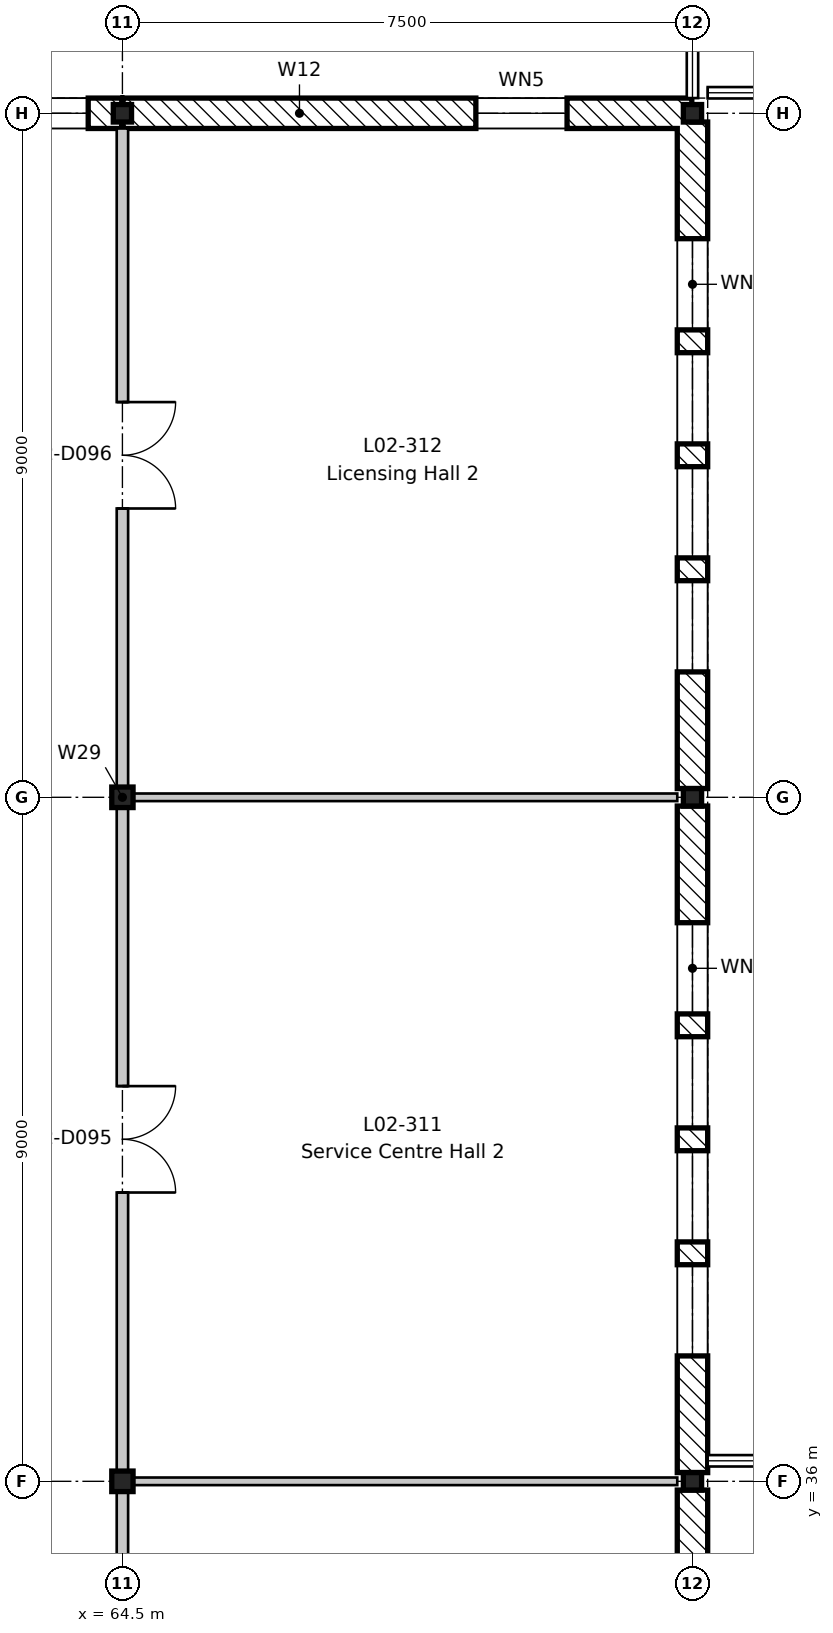
"""IFC4 building model, lengths in metres.
Left out: names, types, materials, properties, quantities, classifications, styles, units other than length and angle.
Written with IfcOpenShell. Run it as: python <this file> out.ifc"""

import sys

from ifc_helpers import new_model, si_unit, direction, frame, frame_2d, origin, origin_2d, place, context, subcontext, project, spatial, rectangle, i_section, extrude, element, fill, save


model = new_model("IFC4")
c1 = context("Model", 3, precision=1e-05, world=origin(), true_north=direction((0.0, 1.0)))
c2 = subcontext(c1, "Body", "Model", "MODEL_VIEW")
j1 = project(units=[si_unit("LENGTHUNIT", "METRE"), si_unit("PLANEANGLEUNIT", "RADIAN")], contexts=[c1])
p1 = place(None, origin())
s1 = spatial("IfcSite", under=j1, at=p1, CompositionType="ELEMENT")
p2 = place(p1, origin())
s2 = spatial("IfcBuilding", under=s1, at=p2, CompositionType="ELEMENT")
p3 = place(p2, frame((0.0, 0.0, 9.9)))
s3 = spatial("IfcBuildingStorey", under=s2, at=p3, CompositionType="ELEMENT", Elevation=9.9)
for number, where, z_axis, x_axis in (
    (1, (64.5, 36.0, -0.2), (0.0, 0.0, 1.0), (1.0, 0.0, 0.0)),
    (2, (64.5, 45.0, -0.2), (0.0, 0.0, 1.0), (1.0, 0.0, 0.0)),
):
    element("IfcColumn", number, at=place(p3, frame(where, z_axis=z_axis, x_axis=x_axis)), inside=s3, PredefinedType="COLUMN", context=c2, shape_type="SweptSolid", body=[
        extrude(i_section(OverallWidth=0.28, OverallDepth=0.27, WebThickness=0.008, FlangeThickness=0.013, FilletRadius=0.024, at=origin_2d()), origin(), (0.0, 0.0, 1.0), 4.5),
    ])
for number, where, z_axis, x_axis in (
    (3, (64.5, 54.0, -0.2), (0.0, 0.0, 1.0), (1.0, 0.0, 0.0)),
    (4, (72.0, 36.0, -0.2), (0.0, 0.0, 1.0), (1.0, 0.0, 0.0)),
    (5, (72.0, 45.0, -0.2), (0.0, 0.0, 1.0), (1.0, 0.0, 0.0)),
    (6, (72.0, 54.0, -0.2), (0.0, 0.0, 1.0), (1.0, 0.0, 0.0)),
):
    element("IfcColumn", number, at=place(p3, frame(where, z_axis=z_axis, x_axis=x_axis)), inside=s3, PredefinedType="COLUMN", context=c2, shape_type="SweptSolid", body=[
        extrude(i_section(OverallWidth=0.24, OverallDepth=0.23, WebThickness=0.008, FlangeThickness=0.012, FilletRadius=0.021, at=origin_2d()), origin(), (0.0, 0.0, 1.0), 4.5),
    ])
p4 = place(p3, frame((61.509, 54.0, 0.0), z_axis=(0.0, 0.0, 1.0), x_axis=(1.0, 0.0, 0.0)))
e7 = element("IfcWall", 7, at=p4, inside=s3, PredefinedType="STANDARD", context=c2, shape_type="SweptSolid", body=[
    extrude(rectangle(XDim=2.982, YDim=0.4, at=frame_2d((1.491, 0.0))), origin(), (0.0, 0.0, 1.0), 4.1),
])
p5 = place(p4, frame((0.441, 0.0, 0.9)))
e8 = element("IfcOpeningElement", 8, at=p5, cuts=e7, PredefinedType="OPENING", context=c2, shape_type="SweptSolid", body=[
    extrude(rectangle(XDim=2.1, YDim=2.1, at=frame_2d((1.05, 1.05))), frame((0.0, 0.21, 0.0), z_axis=(0.0, -1.0, 0.0), x_axis=(1.0, 0.0, 0.0)), (0.0, 0.0, 1.0), 0.42),
])
p6 = place(p3, frame((64.509, 54.0, 0.0), z_axis=(0.0, 0.0, 1.0), x_axis=(1.0, 0.0, 0.0)))
e9 = element("IfcWall", 9, at=p6, inside=s3, PredefinedType="STANDARD", context=c2, shape_type="SweptSolid", body=[
    extrude(rectangle(XDim=7.482, YDim=0.4, at=frame_2d((3.741, 0.0))), origin(), (0.0, 0.0, 1.0), 3.97),
])
p7 = place(p6, frame((4.641, 0.0, 0.6)))
e10 = element("IfcOpeningElement", 10, at=p7, cuts=e9, PredefinedType="OPENING", context=c2, shape_type="SweptSolid", body=[
    extrude(rectangle(XDim=1.2, YDim=3.0, at=frame_2d((0.6, 1.5))), frame((0.0, 0.21, 0.0), z_axis=(0.0, -1.0, 0.0), x_axis=(1.0, 0.0, 0.0)), (0.0, 0.0, 1.0), 0.42),
])
p8 = place(p3, frame((72.0, 35.885, 0.0), z_axis=(0.0, 0.0, 1.0), x_axis=(0.0, -1.0, 0.0)))
e11 = element("IfcWall", 11, at=p8, inside=s3, PredefinedType="STANDARD", context=c2, shape_type="SweptSolid", body=[
    extrude(rectangle(XDim=8.77, YDim=0.4, at=frame_2d((4.385, 0.0))), origin(), (0.0, 0.0, 1.0), 3.9),
])
p9 = place(p8, frame((6.035, 0.0, 0.6)))
e12 = element("IfcOpeningElement", 12, at=p9, cuts=e11, PredefinedType="OPENING", context=c2, shape_type="SweptSolid", body=[
    extrude(rectangle(XDim=1.2, YDim=3.0, at=frame_2d((0.6, 1.5))), frame((0.0, 0.21, 0.0), z_axis=(0.0, -1.0, 0.0), x_axis=(1.0, 0.0, 0.0)), (0.0, 0.0, 1.0), 0.42),
])
p10 = place(p8, frame((4.535, 0.0, 0.6)))
e13 = element("IfcOpeningElement", 13, at=p10, cuts=e11, PredefinedType="OPENING", context=c2, shape_type="SweptSolid", body=[
    extrude(rectangle(XDim=1.2, YDim=3.0, at=frame_2d((0.6, 1.5))), frame((0.0, 0.21, 0.0), z_axis=(0.0, -1.0, 0.0), x_axis=(1.0, 0.0, 0.0)), (0.0, 0.0, 1.0), 0.42),
])
p11 = place(p8, frame((3.035, 0.0, 0.6)))
e14 = element("IfcOpeningElement", 14, at=p11, cuts=e11, PredefinedType="OPENING", context=c2, shape_type="SweptSolid", body=[
    extrude(rectangle(XDim=1.2, YDim=3.0, at=frame_2d((0.6, 1.5))), frame((0.0, 0.21, 0.0), z_axis=(0.0, -1.0, 0.0), x_axis=(1.0, 0.0, 0.0)), (0.0, 0.0, 1.0), 0.42),
])
p12 = place(p8, frame((1.535, 0.0, 0.6)))
e15 = element("IfcOpeningElement", 15, at=p12, cuts=e11, PredefinedType="OPENING", context=c2, shape_type="SweptSolid", body=[
    extrude(rectangle(XDim=1.2, YDim=3.0, at=frame_2d((0.6, 1.5))), frame((0.0, 0.21, 0.0), z_axis=(0.0, -1.0, 0.0), x_axis=(1.0, 0.0, 0.0)), (0.0, 0.0, 1.0), 0.42),
])
p13 = place(p3, frame((72.0, 44.885, 0.0), z_axis=(0.0, 0.0, 1.0), x_axis=(0.0, -1.0, 0.0)))
e16 = element("IfcWall", 16, at=p13, inside=s3, PredefinedType="STANDARD", context=c2, shape_type="SweptSolid", body=[
    extrude(rectangle(XDim=8.77, YDim=0.4, at=frame_2d((4.385, 0.0))), origin(), (0.0, 0.0, 1.0), 3.9),
])
p14 = place(p13, frame((6.035, 0.0, 0.6)))
e17 = element("IfcOpeningElement", 17, at=p14, cuts=e16, PredefinedType="OPENING", context=c2, shape_type="SweptSolid", body=[
    extrude(rectangle(XDim=1.2, YDim=3.0, at=frame_2d((0.6, 1.5))), frame((0.0, 0.21, 0.0), z_axis=(0.0, -1.0, 0.0), x_axis=(1.0, 0.0, 0.0)), (0.0, 0.0, 1.0), 0.42),
])
p15 = place(p13, frame((4.535, 0.0, 0.6)))
e18 = element("IfcOpeningElement", 18, at=p15, cuts=e16, PredefinedType="OPENING", context=c2, shape_type="SweptSolid", body=[
    extrude(rectangle(XDim=1.2, YDim=3.0, at=frame_2d((0.6, 1.5))), frame((0.0, 0.21, 0.0), z_axis=(0.0, -1.0, 0.0), x_axis=(1.0, 0.0, 0.0)), (0.0, 0.0, 1.0), 0.42),
])
p16 = place(p13, frame((3.035, 0.0, 0.6)))
e19 = element("IfcOpeningElement", 19, at=p16, cuts=e16, PredefinedType="OPENING", context=c2, shape_type="SweptSolid", body=[
    extrude(rectangle(XDim=1.2, YDim=3.0, at=frame_2d((0.6, 1.5))), frame((0.0, 0.21, 0.0), z_axis=(0.0, -1.0, 0.0), x_axis=(1.0, 0.0, 0.0)), (0.0, 0.0, 1.0), 0.42),
])
p17 = place(p13, frame((1.535, 0.0, 0.6)))
e20 = element("IfcOpeningElement", 20, at=p17, cuts=e16, PredefinedType="OPENING", context=c2, shape_type="SweptSolid", body=[
    extrude(rectangle(XDim=1.2, YDim=3.0, at=frame_2d((0.6, 1.5))), frame((0.0, 0.21, 0.0), z_axis=(0.0, -1.0, 0.0), x_axis=(1.0, 0.0, 0.0)), (0.0, 0.0, 1.0), 0.42),
])
p18 = place(p3, frame((72.0, 53.885, 0.0), z_axis=(0.0, 0.0, 1.0), x_axis=(0.0, -1.0, 0.0)))
e21 = element("IfcWall", 21, at=p18, inside=s3, PredefinedType="STANDARD", context=c2, shape_type="SweptSolid", body=[
    extrude(rectangle(XDim=8.77, YDim=0.4, at=frame_2d((4.385, 0.0))), origin(), (0.0, 0.0, 1.0), 3.9),
])
p19 = place(p18, frame((6.035, 0.0, 0.6)))
e22 = element("IfcOpeningElement", 22, at=p19, cuts=e21, PredefinedType="OPENING", context=c2, shape_type="SweptSolid", body=[
    extrude(rectangle(XDim=1.2, YDim=3.0, at=frame_2d((0.6, 1.5))), frame((0.0, 0.21, 0.0), z_axis=(0.0, -1.0, 0.0), x_axis=(1.0, 0.0, 0.0)), (0.0, 0.0, 1.0), 0.42),
])
p20 = place(p18, frame((4.535, 0.0, 0.6)))
e23 = element("IfcOpeningElement", 23, at=p20, cuts=e21, PredefinedType="OPENING", context=c2, shape_type="SweptSolid", body=[
    extrude(rectangle(XDim=1.2, YDim=3.0, at=frame_2d((0.6, 1.5))), frame((0.0, 0.21, 0.0), z_axis=(0.0, -1.0, 0.0), x_axis=(1.0, 0.0, 0.0)), (0.0, 0.0, 1.0), 0.42),
])
p21 = place(p18, frame((3.035, 0.0, 0.6)))
e24 = element("IfcOpeningElement", 24, at=p21, cuts=e21, PredefinedType="OPENING", context=c2, shape_type="SweptSolid", body=[
    extrude(rectangle(XDim=1.2, YDim=3.0, at=frame_2d((0.6, 1.5))), frame((0.0, 0.21, 0.0), z_axis=(0.0, -1.0, 0.0), x_axis=(1.0, 0.0, 0.0)), (0.0, 0.0, 1.0), 0.42),
])
p22 = place(p18, frame((1.535, 0.0, 0.6)))
e25 = element("IfcOpeningElement", 25, at=p22, cuts=e21, PredefinedType="OPENING", context=c2, shape_type="SweptSolid", body=[
    extrude(rectangle(XDim=1.2, YDim=3.0, at=frame_2d((0.6, 1.5))), frame((0.0, 0.21, 0.0), z_axis=(0.0, -1.0, 0.0), x_axis=(1.0, 0.0, 0.0)), (0.0, 0.0, 1.0), 0.42),
])
for number, where, z_axis, x_axis in (
    (26, (64.575, 36.0, 0.0), (0.0, 0.0, 1.0), (1.0, 0.0, 0.0)),
    (27, (64.575, 45.0, 0.0), (0.0, 0.0, 1.0), (1.0, 0.0, 0.0)),
):
    element("IfcWall", number, at=place(p3, frame(where, z_axis=z_axis, x_axis=x_axis)), inside=s3, PredefinedType="PARTITIONING", context=c2, shape_type="SweptSolid", body=[
        extrude(rectangle(XDim=7.225, YDim=0.1, at=frame_2d((3.613, 0.0))), origin(), (0.0, 0.0, 1.0), 3.95),
    ])
p23 = place(p3, frame((64.5, 0.2, 0.0), z_axis=(0.0, 0.0, 1.0), x_axis=(0.0, 1.0, 0.0)))
e28 = element("IfcWall", 28, at=p23, inside=s3, PredefinedType="PARTITIONING", context=c2, shape_type="SweptSolid", body=[
    extrude(rectangle(XDim=53.6, YDim=0.15, at=frame_2d((26.8, 0.0))), origin(), (0.0, 0.0, 1.0), 3.78),
])
p24 = place(p23, frame((3.6, 0.0, 0.0)))
e29 = element("IfcOpeningElement", 29, at=p24, cuts=e28, PredefinedType="OPENING", context=c2, shape_type="SweptSolid", body=[
    extrude(rectangle(XDim=1.4, YDim=2.1, at=frame_2d((0.7, 1.05))), frame((0.0, 0.085, 0.0), z_axis=(0.0, -1.0, 0.0), x_axis=(1.0, 0.0, 0.0)), (0.0, 0.0, 1.0), 0.17),
])
p25 = place(p23, frame((12.6, 0.0, 0.0)))
e30 = element("IfcOpeningElement", 30, at=p25, cuts=e28, PredefinedType="OPENING", context=c2, shape_type="SweptSolid", body=[
    extrude(rectangle(XDim=1.4, YDim=2.1, at=frame_2d((0.7, 1.05))), frame((0.0, 0.085, 0.0), z_axis=(0.0, -1.0, 0.0), x_axis=(1.0, 0.0, 0.0)), (0.0, 0.0, 1.0), 0.17),
])
p26 = place(p23, frame((21.6, 0.0, 0.0)))
e31 = element("IfcOpeningElement", 31, at=p26, cuts=e28, PredefinedType="OPENING", context=c2, shape_type="SweptSolid", body=[
    extrude(rectangle(XDim=1.4, YDim=2.1, at=frame_2d((0.7, 1.05))), frame((0.0, 0.085, 0.0), z_axis=(0.0, -1.0, 0.0), x_axis=(1.0, 0.0, 0.0)), (0.0, 0.0, 1.0), 0.17),
])
p27 = place(p23, frame((27.8, 0.0, 0.0)))
e32 = element("IfcOpeningElement", 32, at=p27, cuts=e28, PredefinedType="OPENING", context=c2, shape_type="SweptSolid", body=[
    extrude(rectangle(XDim=1.0, YDim=2.1, at=frame_2d((0.5, 1.05))), frame((0.0, 0.085, 0.0), z_axis=(0.0, -1.0, 0.0), x_axis=(1.0, 0.0, 0.0)), (0.0, 0.0, 1.0), 0.17),
])
p28 = place(p23, frame((32.3, 0.0, 0.0)))
e33 = element("IfcOpeningElement", 33, at=p28, cuts=e28, PredefinedType="OPENING", context=c2, shape_type="SweptSolid", body=[
    extrude(rectangle(XDim=1.0, YDim=2.1, at=frame_2d((0.5, 1.05))), frame((0.0, 0.085, 0.0), z_axis=(0.0, -1.0, 0.0), x_axis=(1.0, 0.0, 0.0)), (0.0, 0.0, 1.0), 0.17),
])
p29 = place(p23, frame((39.6, 0.0, 0.0)))
e34 = element("IfcOpeningElement", 34, at=p29, cuts=e28, PredefinedType="OPENING", context=c2, shape_type="SweptSolid", body=[
    extrude(rectangle(XDim=1.4, YDim=2.1, at=frame_2d((0.7, 1.05))), frame((0.0, 0.085, 0.0), z_axis=(0.0, -1.0, 0.0), x_axis=(1.0, 0.0, 0.0)), (0.0, 0.0, 1.0), 0.17),
])
p30 = place(p23, frame((48.6, 0.0, 0.0)))
e35 = element("IfcOpeningElement", 35, at=p30, cuts=e28, PredefinedType="OPENING", context=c2, shape_type="SweptSolid", body=[
    extrude(rectangle(XDim=1.4, YDim=2.1, at=frame_2d((0.7, 1.05))), frame((0.0, 0.085, 0.0), z_axis=(0.0, -1.0, 0.0), x_axis=(1.0, 0.0, 0.0)), (0.0, 0.0, 1.0), 0.17),
])
p31 = place(p5, origin())
e36 = element("IfcWindow", 36, at=p31, inside=s3, PartitioningType="SINGLE_PANEL", PredefinedType="WINDOW", context=c2, shape_type="SweptSolid", body=[
    extrude(rectangle(XDim=2.1, YDim=2.1, at=frame_2d((1.05, 1.05))), frame((0.0, 0.03, 0.0), z_axis=(0.0, -1.0, 0.0), x_axis=(1.0, 0.0, 0.0)), (0.0, 0.0, 1.0), 0.06),
])
fill(e8, e36)
p32 = place(p7, origin())
e37 = element("IfcWindow", 37, at=p32, inside=s3, PartitioningType="SINGLE_PANEL", PredefinedType="WINDOW", context=c2, shape_type="SweptSolid", body=[
    extrude(rectangle(XDim=1.2, YDim=3.0, at=frame_2d((0.6, 1.5))), frame((0.0, 0.03, 0.0), z_axis=(0.0, -1.0, 0.0), x_axis=(1.0, 0.0, 0.0)), (0.0, 0.0, 1.0), 0.06),
])
fill(e10, e37)
p33 = place(p14, origin())
e38 = element("IfcWindow", 38, at=p33, inside=s3, PartitioningType="SINGLE_PANEL", PredefinedType="WINDOW", context=c2, shape_type="SweptSolid", body=[
    extrude(rectangle(XDim=1.2, YDim=3.0, at=frame_2d((0.6, 1.5))), frame((0.0, 0.03, 0.0), z_axis=(0.0, -1.0, 0.0), x_axis=(1.0, 0.0, 0.0)), (0.0, 0.0, 1.0), 0.06),
])
fill(e17, e38)
p34 = place(p15, origin())
e39 = element("IfcWindow", 39, at=p34, inside=s3, PartitioningType="SINGLE_PANEL", PredefinedType="WINDOW", context=c2, shape_type="SweptSolid", body=[
    extrude(rectangle(XDim=1.2, YDim=3.0, at=frame_2d((0.6, 1.5))), frame((0.0, 0.03, 0.0), z_axis=(0.0, -1.0, 0.0), x_axis=(1.0, 0.0, 0.0)), (0.0, 0.0, 1.0), 0.06),
])
fill(e18, e39)
p35 = place(p16, origin())
e40 = element("IfcWindow", 40, at=p35, inside=s3, PartitioningType="SINGLE_PANEL", PredefinedType="WINDOW", context=c2, shape_type="SweptSolid", body=[
    extrude(rectangle(XDim=1.2, YDim=3.0, at=frame_2d((0.6, 1.5))), frame((0.0, 0.03, 0.0), z_axis=(0.0, -1.0, 0.0), x_axis=(1.0, 0.0, 0.0)), (0.0, 0.0, 1.0), 0.06),
])
fill(e19, e40)
p36 = place(p17, origin())
e41 = element("IfcWindow", 41, at=p36, inside=s3, PartitioningType="SINGLE_PANEL", PredefinedType="WINDOW", context=c2, shape_type="SweptSolid", body=[
    extrude(rectangle(XDim=1.2, YDim=3.0, at=frame_2d((0.6, 1.5))), frame((0.0, 0.03, 0.0), z_axis=(0.0, -1.0, 0.0), x_axis=(1.0, 0.0, 0.0)), (0.0, 0.0, 1.0), 0.06),
])
fill(e20, e41)
p37 = place(p19, origin())
e42 = element("IfcWindow", 42, at=p37, inside=s3, PartitioningType="SINGLE_PANEL", PredefinedType="WINDOW", context=c2, shape_type="SweptSolid", body=[
    extrude(rectangle(XDim=1.2, YDim=3.0, at=frame_2d((0.6, 1.5))), frame((0.0, 0.03, 0.0), z_axis=(0.0, -1.0, 0.0), x_axis=(1.0, 0.0, 0.0)), (0.0, 0.0, 1.0), 0.06),
])
fill(e22, e42)
p38 = place(p20, origin())
e43 = element("IfcWindow", 43, at=p38, inside=s3, PartitioningType="SINGLE_PANEL", PredefinedType="WINDOW", context=c2, shape_type="SweptSolid", body=[
    extrude(rectangle(XDim=1.2, YDim=3.0, at=frame_2d((0.6, 1.5))), frame((0.0, 0.03, 0.0), z_axis=(0.0, -1.0, 0.0), x_axis=(1.0, 0.0, 0.0)), (0.0, 0.0, 1.0), 0.06),
])
fill(e23, e43)
p39 = place(p21, origin())
e44 = element("IfcWindow", 44, at=p39, inside=s3, PartitioningType="SINGLE_PANEL", PredefinedType="WINDOW", context=c2, shape_type="SweptSolid", body=[
    extrude(rectangle(XDim=1.2, YDim=3.0, at=frame_2d((0.6, 1.5))), frame((0.0, 0.03, 0.0), z_axis=(0.0, -1.0, 0.0), x_axis=(1.0, 0.0, 0.0)), (0.0, 0.0, 1.0), 0.06),
])
fill(e24, e44)
p40 = place(p22, origin())
e45 = element("IfcWindow", 45, at=p40, inside=s3, PartitioningType="SINGLE_PANEL", PredefinedType="WINDOW", context=c2, shape_type="SweptSolid", body=[
    extrude(rectangle(XDim=1.2, YDim=3.0, at=frame_2d((0.6, 1.5))), frame((0.0, 0.03, 0.0), z_axis=(0.0, -1.0, 0.0), x_axis=(1.0, 0.0, 0.0)), (0.0, 0.0, 1.0), 0.06),
])
fill(e25, e45)
p41 = place(p29, frame((1.4, 0.0, 0.0), z_axis=(0.0, 0.0, 1.0), x_axis=(-1.0, 0.0, 0.0)))
e46 = element("IfcDoor", 46, at=p41, inside=s3, OperationType="DOUBLE_DOOR_SINGLE_SWING", PredefinedType="DOOR", context=c2, shape_type="SweptSolid", body=[
    extrude(rectangle(XDim=1.4, YDim=2.1, at=frame_2d((0.7, 1.05))), frame((0.0, 0.025, 0.0), z_axis=(0.0, -1.0, 0.0), x_axis=(1.0, 0.0, 0.0)), (0.0, 0.0, 1.0), 0.05),
])
fill(e34, e46)
p42 = place(p30, frame((1.4, 0.0, 0.0), z_axis=(0.0, 0.0, 1.0), x_axis=(-1.0, 0.0, 0.0)))
e47 = element("IfcDoor", 47, at=p42, inside=s3, OperationType="DOUBLE_DOOR_SINGLE_SWING", PredefinedType="DOOR", context=c2, shape_type="SweptSolid", body=[
    extrude(rectangle(XDim=1.4, YDim=2.1, at=frame_2d((0.7, 1.05))), frame((0.0, 0.025, 0.0), z_axis=(0.0, -1.0, 0.0), x_axis=(1.0, 0.0, 0.0)), (0.0, 0.0, 1.0), 0.05),
])
fill(e35, e47)
save(model, sys.argv[1])
